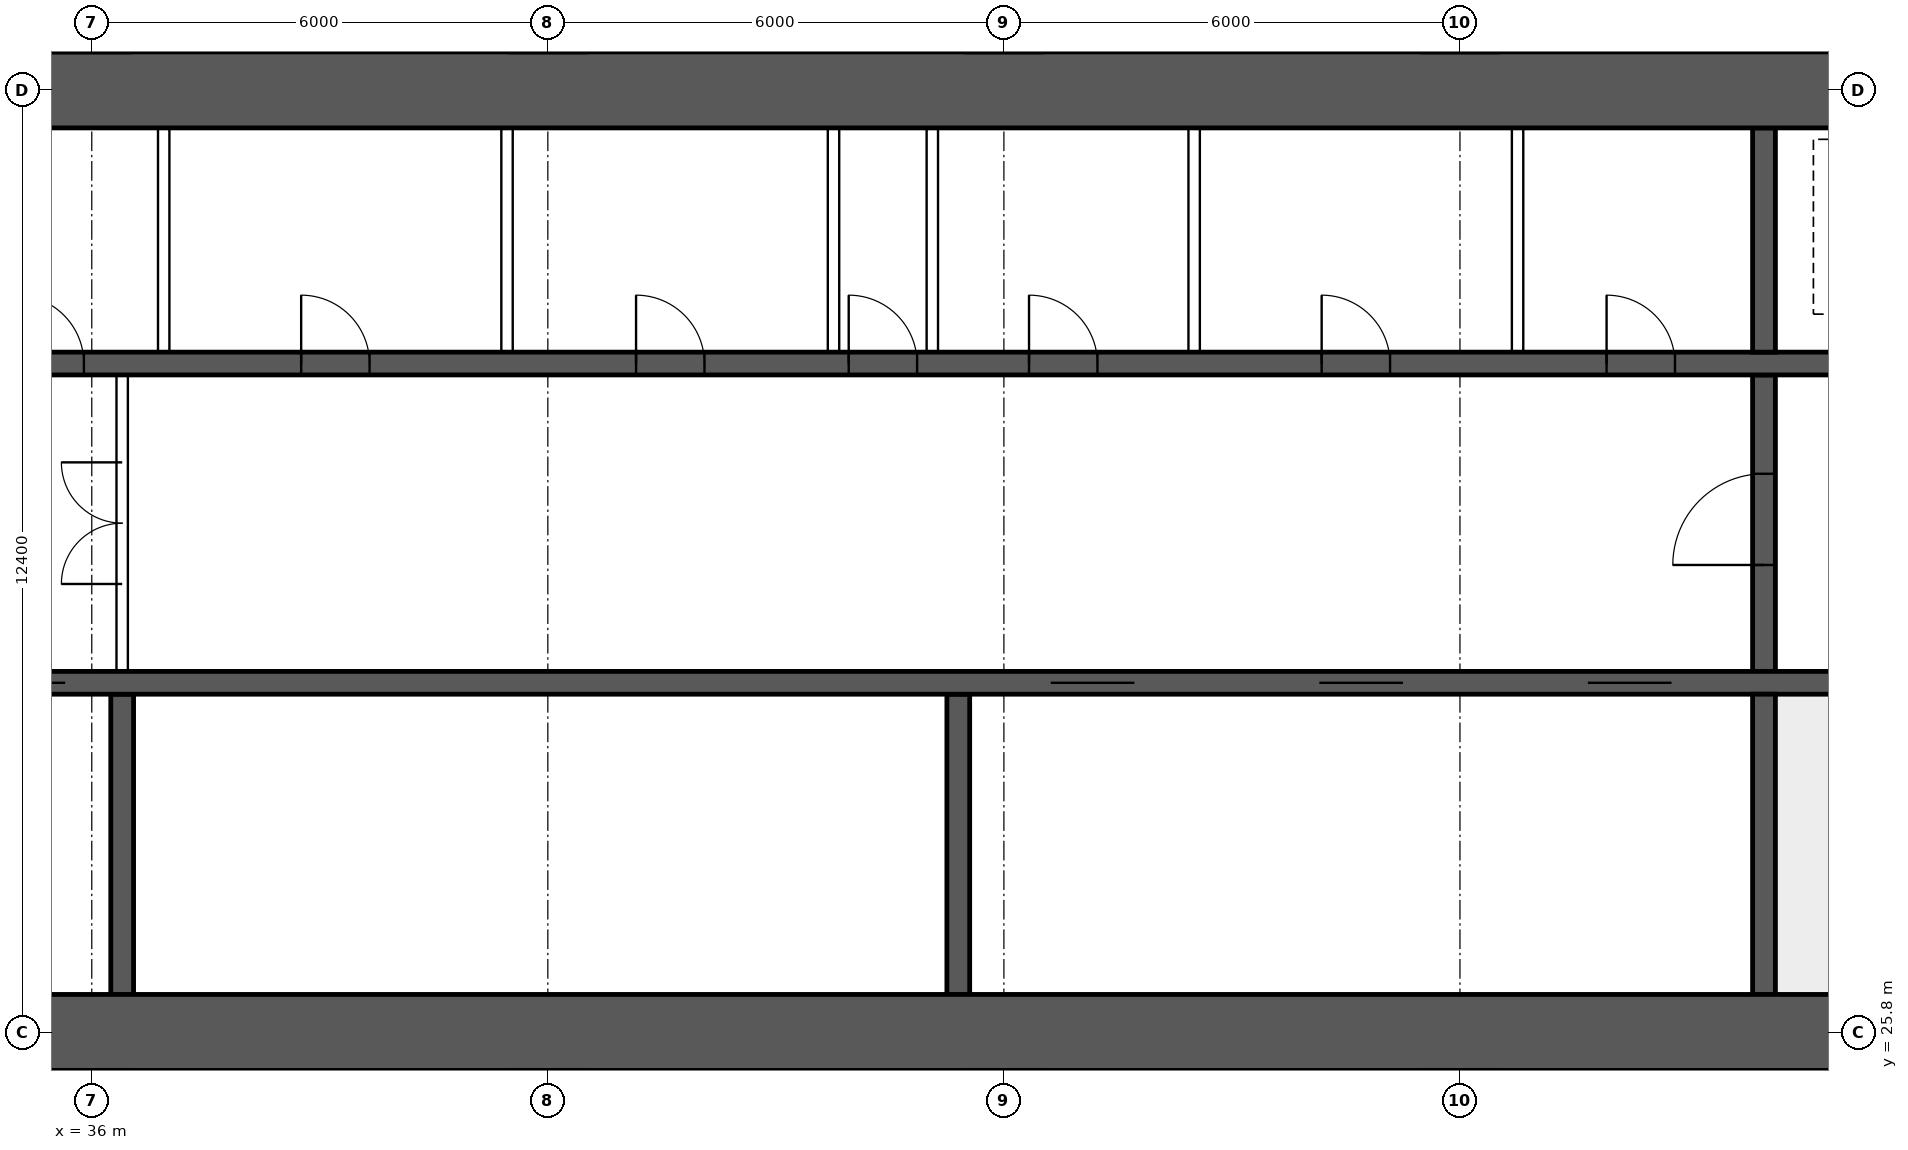
"""IFC4 building model, lengths in metres.
Left out: names, types, materials, properties, quantities, classifications, styles, units other than length and angle.
Written with IfcOpenShell. Run it as: python <this file> out.ifc"""

import sys

from ifc_helpers import new_model, si_unit, direction, frame, frame_2d, origin, place, context, subcontext, project, spatial, rectangle, extrude, element, fill, save


model = new_model("IFC4")
c1 = context("Model", 3, precision=1e-05, world=origin(), true_north=direction((0.0, 1.0)))
c2 = subcontext(c1, "Body", "Model", "MODEL_VIEW")
j1 = project(units=[si_unit("LENGTHUNIT", "METRE"), si_unit("PLANEANGLEUNIT", "RADIAN")], contexts=[c1])
p1 = place(None, origin())
s1 = spatial("IfcSite", under=j1, at=p1, CompositionType="ELEMENT")
p2 = place(p1, origin())
s2 = spatial("IfcBuilding", under=s1, at=p2, CompositionType="ELEMENT")
p3 = place(p2, frame((0.0, 0.0, 20.2)))
s3 = spatial("IfcBuildingStorey", under=s2, at=p3, CompositionType="ELEMENT", Elevation=20.2)
for number, where, z_axis, x_axis in (
    (1, (18.0, 25.8, 0.0), (0.0, 0.0, 1.0), (1.0, 0.0, 0.0)),
    (2, (18.0, 38.2, 0.0), (0.0, 0.0, 1.0), (1.0, 0.0, 0.0)),
):
    element("IfcWall", number, at=place(p3, frame(where, z_axis=z_axis, x_axis=x_axis)), inside=s3, PredefinedType="SHEAR", context=c2, shape_type="SweptSolid", body=[
        extrude(rectangle(XDim=48.0, YDim=1.0, at=frame_2d((24.0, 0.0))), origin(), (0.0, 0.0, 1.0), 3.75),
    ])
p4 = place(p3, frame((18.5, 30.4, 0.0), z_axis=(0.0, 0.0, 1.0), x_axis=(1.0, 0.0, 0.0)))
e3 = element("IfcWall", 3, at=p4, inside=s3, PredefinedType="SHEAR", context=c2, shape_type="SweptSolid", body=[
    extrude(rectangle(XDim=47.0, YDim=0.3, at=frame_2d((23.5, 0.0))), origin(), (0.0, 0.0, 1.0), 3.75),
])
p5 = place(p4, frame((0.4, 0.0, 0.0)))
e4 = element("IfcOpeningElement", 4, at=p5, cuts=e3, PredefinedType="OPENING", context=c2, shape_type="SweptSolid", body=[
    extrude(rectangle(XDim=1.0, YDim=2.1, at=frame_2d((0.5, 1.05))), frame((0.0, 0.16, 0.0), z_axis=(0.0, -1.0, 0.0), x_axis=(1.0, 0.0, 0.0)), (0.0, 0.0, 1.0), 0.32),
])
p6 = place(p4, frame((45.6, 0.0, 0.0)))
e5 = element("IfcOpeningElement", 5, at=p6, cuts=e3, PredefinedType="OPENING", context=c2, shape_type="SweptSolid", body=[
    extrude(rectangle(XDim=1.0, YDim=2.1, at=frame_2d((0.5, 1.05))), frame((0.0, 0.16, 0.0), z_axis=(0.0, -1.0, 0.0), x_axis=(1.0, 0.0, 0.0)), (0.0, 0.0, 1.0), 0.32),
])
p7 = place(p4, frame((8.25, 0.0, 0.0)))
e6 = element("IfcOpeningElement", 6, at=p7, cuts=e3, PredefinedType="OPENING", context=c2, shape_type="SweptSolid", body=[
    extrude(rectangle(XDim=1.1, YDim=2.1, at=frame_2d((0.55, 1.05))), frame((0.0, 0.16, 0.0), z_axis=(0.0, -1.0, 0.0), x_axis=(1.0, 0.0, 0.0)), (0.0, 0.0, 1.0), 0.32),
])
p8 = place(p4, frame((10.85, 0.0, 0.0)))
e7 = element("IfcOpeningElement", 7, at=p8, cuts=e3, PredefinedType="OPENING", context=c2, shape_type="SweptSolid", body=[
    extrude(rectangle(XDim=1.1, YDim=2.1, at=frame_2d((0.55, 1.05))), frame((0.0, 0.16, 0.0), z_axis=(0.0, -1.0, 0.0), x_axis=(1.0, 0.0, 0.0)), (0.0, 0.0, 1.0), 0.32),
])
p9 = place(p4, frame((13.45, 0.0, 0.0)))
e8 = element("IfcOpeningElement", 8, at=p9, cuts=e3, PredefinedType="OPENING", context=c2, shape_type="SweptSolid", body=[
    extrude(rectangle(XDim=1.1, YDim=2.1, at=frame_2d((0.55, 1.05))), frame((0.0, 0.16, 0.0), z_axis=(0.0, -1.0, 0.0), x_axis=(1.0, 0.0, 0.0)), (0.0, 0.0, 1.0), 0.32),
])
p10 = place(p4, frame((16.05, 0.0, 0.0)))
e9 = element("IfcOpeningElement", 9, at=p10, cuts=e3, PredefinedType="OPENING", context=c2, shape_type="SweptSolid", body=[
    extrude(rectangle(XDim=1.1, YDim=2.1, at=frame_2d((0.55, 1.05))), frame((0.0, 0.16, 0.0), z_axis=(0.0, -1.0, 0.0), x_axis=(1.0, 0.0, 0.0)), (0.0, 0.0, 1.0), 0.32),
])
p11 = place(p4, frame((30.117, 0.0, 0.0)))
e10 = element("IfcOpeningElement", 10, at=p11, cuts=e3, PredefinedType="OPENING", context=c2, shape_type="SweptSolid", body=[
    extrude(rectangle(XDim=1.1, YDim=2.1, at=frame_2d((0.55, 1.05))), frame((0.0, 0.16, 0.0), z_axis=(0.0, -1.0, 0.0), x_axis=(1.0, 0.0, 0.0)), (0.0, 0.0, 1.0), 0.32),
])
p12 = place(p4, frame((33.65, 0.0, 0.0)))
e11 = element("IfcOpeningElement", 11, at=p12, cuts=e3, PredefinedType="OPENING", context=c2, shape_type="SweptSolid", body=[
    extrude(rectangle(XDim=1.1, YDim=2.1, at=frame_2d((0.55, 1.05))), frame((0.0, 0.16, 0.0), z_axis=(0.0, -1.0, 0.0), x_axis=(1.0, 0.0, 0.0)), (0.0, 0.0, 1.0), 0.32),
])
p13 = place(p4, frame((37.183, 0.0, 0.0)))
e12 = element("IfcOpeningElement", 12, at=p13, cuts=e3, PredefinedType="OPENING", context=c2, shape_type="SweptSolid", body=[
    extrude(rectangle(XDim=1.1, YDim=2.1, at=frame_2d((0.55, 1.05))), frame((0.0, 0.16, 0.0), z_axis=(0.0, -1.0, 0.0), x_axis=(1.0, 0.0, 0.0)), (0.0, 0.0, 1.0), 0.32),
])
p14 = place(p3, frame((18.5, 34.6, 0.0), z_axis=(0.0, 0.0, 1.0), x_axis=(1.0, 0.0, 0.0)))
e13 = element("IfcWall", 13, at=p14, inside=s3, PredefinedType="SHEAR", context=c2, shape_type="SweptSolid", body=[
    extrude(rectangle(XDim=47.0, YDim=0.3, at=frame_2d((23.5, 0.0))), origin(), (0.0, 0.0, 1.0), 3.75),
])
p15 = place(p14, frame((0.9, 0.0, 0.0)))
e14 = element("IfcOpeningElement", 14, at=p15, cuts=e13, PredefinedType="OPENING", context=c2, shape_type="SweptSolid", body=[
    extrude(rectangle(XDim=1.1, YDim=2.1, at=frame_2d((0.55, 1.05))), frame((0.0, 0.16, 0.0), z_axis=(0.0, -1.0, 0.0), x_axis=(1.0, 0.0, 0.0)), (0.0, 0.0, 1.0), 0.32),
])
p16 = place(p14, frame((45.0, 0.0, 0.0)))
e15 = element("IfcOpeningElement", 15, at=p16, cuts=e13, PredefinedType="OPENING", context=c2, shape_type="SweptSolid", body=[
    extrude(rectangle(XDim=1.1, YDim=2.1, at=frame_2d((0.55, 1.05))), frame((0.0, 0.16, 0.0), z_axis=(0.0, -1.0, 0.0), x_axis=(1.0, 0.0, 0.0)), (0.0, 0.0, 1.0), 0.32),
])
p17 = place(p14, frame((4.1, 0.0, 0.0)))
e16 = element("IfcOpeningElement", 16, at=p17, cuts=e13, PredefinedType="OPENING", context=c2, shape_type="SweptSolid", body=[
    extrude(rectangle(XDim=0.9, YDim=2.1, at=frame_2d((0.45, 1.05))), frame((0.0, 0.16, 0.0), z_axis=(0.0, -1.0, 0.0), x_axis=(1.0, 0.0, 0.0)), (0.0, 0.0, 1.0), 0.32),
])
p18 = place(p14, frame((42.0, 0.0, 0.0)))
e17 = element("IfcOpeningElement", 17, at=p18, cuts=e13, PredefinedType="OPENING", context=c2, shape_type="SweptSolid", body=[
    extrude(rectangle(XDim=0.9, YDim=2.1, at=frame_2d((0.45, 1.05))), frame((0.0, 0.16, 0.0), z_axis=(0.0, -1.0, 0.0), x_axis=(1.0, 0.0, 0.0)), (0.0, 0.0, 1.0), 0.32),
])
p19 = place(p14, frame((8.875, 0.0, 0.0)))
e18 = element("IfcOpeningElement", 18, at=p19, cuts=e13, PredefinedType="OPENING", context=c2, shape_type="SweptSolid", body=[
    extrude(rectangle(XDim=0.9, YDim=2.1, at=frame_2d((0.45, 1.05))), frame((0.0, 0.16, 0.0), z_axis=(0.0, -1.0, 0.0), x_axis=(1.0, 0.0, 0.0)), (0.0, 0.0, 1.0), 0.32),
])
p20 = place(p14, frame((12.849, 0.0, 0.0)))
e19 = element("IfcOpeningElement", 19, at=p20, cuts=e13, PredefinedType="OPENING", context=c2, shape_type="SweptSolid", body=[
    extrude(rectangle(XDim=0.9, YDim=2.1, at=frame_2d((0.45, 1.05))), frame((0.0, 0.16, 0.0), z_axis=(0.0, -1.0, 0.0), x_axis=(1.0, 0.0, 0.0)), (0.0, 0.0, 1.0), 0.32),
])
p21 = place(p14, frame((16.496, 0.0, 0.0)))
e20 = element("IfcOpeningElement", 20, at=p21, cuts=e13, PredefinedType="OPENING", context=c2, shape_type="SweptSolid", body=[
    extrude(rectangle(XDim=0.9, YDim=2.1, at=frame_2d((0.45, 1.05))), frame((0.0, 0.16, 0.0), z_axis=(0.0, -1.0, 0.0), x_axis=(1.0, 0.0, 0.0)), (0.0, 0.0, 1.0), 0.32),
])
p22 = place(p14, frame((20.255, 0.0, 0.0)))
e21 = element("IfcOpeningElement", 21, at=p22, cuts=e13, PredefinedType="OPENING", context=c2, shape_type="SweptSolid", body=[
    extrude(rectangle(XDim=0.9, YDim=2.1, at=frame_2d((0.45, 1.05))), frame((0.0, 0.16, 0.0), z_axis=(0.0, -1.0, 0.0), x_axis=(1.0, 0.0, 0.0)), (0.0, 0.0, 1.0), 0.32),
])
p23 = place(p14, frame((24.661, 0.0, 0.0)))
e22 = element("IfcOpeningElement", 22, at=p23, cuts=e13, PredefinedType="OPENING", context=c2, shape_type="SweptSolid", body=[
    extrude(rectangle(XDim=0.9, YDim=2.1, at=frame_2d((0.45, 1.05))), frame((0.0, 0.16, 0.0), z_axis=(0.0, -1.0, 0.0), x_axis=(1.0, 0.0, 0.0)), (0.0, 0.0, 1.0), 0.32),
])
p24 = place(p14, frame((27.458, 0.0, 0.0)))
e23 = element("IfcOpeningElement", 23, at=p24, cuts=e13, PredefinedType="OPENING", context=c2, shape_type="SweptSolid", body=[
    extrude(rectangle(XDim=0.9, YDim=2.1, at=frame_2d((0.45, 1.05))), frame((0.0, 0.16, 0.0), z_axis=(0.0, -1.0, 0.0), x_axis=(1.0, 0.0, 0.0)), (0.0, 0.0, 1.0), 0.32),
])
p25 = place(p14, frame((29.831, 0.0, 0.0)))
e24 = element("IfcOpeningElement", 24, at=p25, cuts=e13, PredefinedType="OPENING", context=c2, shape_type="SweptSolid", body=[
    extrude(rectangle(XDim=0.9, YDim=2.1, at=frame_2d((0.45, 1.05))), frame((0.0, 0.16, 0.0), z_axis=(0.0, -1.0, 0.0), x_axis=(1.0, 0.0, 0.0)), (0.0, 0.0, 1.0), 0.32),
])
p26 = place(p14, frame((33.68, 0.0, 0.0)))
e25 = element("IfcOpeningElement", 25, at=p26, cuts=e13, PredefinedType="OPENING", context=c2, shape_type="SweptSolid", body=[
    extrude(rectangle(XDim=0.9, YDim=2.1, at=frame_2d((0.45, 1.05))), frame((0.0, 0.16, 0.0), z_axis=(0.0, -1.0, 0.0), x_axis=(1.0, 0.0, 0.0)), (0.0, 0.0, 1.0), 0.32),
])
p27 = place(p14, frame((37.429, 0.0, 0.0)))
e26 = element("IfcOpeningElement", 26, at=p27, cuts=e13, PredefinedType="OPENING", context=c2, shape_type="SweptSolid", body=[
    extrude(rectangle(XDim=0.9, YDim=2.1, at=frame_2d((0.45, 1.05))), frame((0.0, 0.16, 0.0), z_axis=(0.0, -1.0, 0.0), x_axis=(1.0, 0.0, 0.0)), (0.0, 0.0, 1.0), 0.32),
])
p28 = place(p3, frame((58.0, 26.3, 0.0), z_axis=(0.0, 0.0, 1.0), x_axis=(0.0, 1.0, 0.0)))
e27 = element("IfcWall", 27, at=p28, inside=s3, PredefinedType="SHEAR", context=c2, shape_type="SweptSolid", body=[
    extrude(rectangle(XDim=3.95, YDim=0.3, at=frame_2d((1.975, 0.0))), origin(), (0.0, 0.0, 1.0), 3.75),
])
p29 = place(p3, frame((58.0, 30.55, 0.0), z_axis=(0.0, 0.0, 1.0), x_axis=(0.0, 1.0, 0.0)))
e28 = element("IfcWall", 28, at=p29, inside=s3, PredefinedType="SHEAR", context=c2, shape_type="SweptSolid", body=[
    extrude(rectangle(XDim=3.9, YDim=0.3, at=frame_2d((1.95, 0.0))), origin(), (0.0, 0.0, 1.0), 3.75),
])
p30 = place(p29, frame((1.4, 0.0, 0.0)))
e29 = element("IfcOpeningElement", 29, at=p30, cuts=e28, PredefinedType="OPENING", context=c2, shape_type="SweptSolid", body=[
    extrude(rectangle(XDim=1.2, YDim=2.1, at=frame_2d((0.6, 1.05))), frame((0.0, 0.16, 0.0), z_axis=(0.0, -1.0, 0.0), x_axis=(1.0, 0.0, 0.0)), (0.0, 0.0, 1.0), 0.32),
])
p31 = place(p3, frame((58.0, 34.75, 0.0), z_axis=(0.0, 0.0, 1.0), x_axis=(0.0, 1.0, 0.0)))
e30 = element("IfcWall", 30, at=p31, inside=s3, PredefinedType="SHEAR", context=c2, shape_type="SweptSolid", body=[
    extrude(rectangle(XDim=2.95, YDim=0.3, at=frame_2d((1.475, 0.0))), origin(), (0.0, 0.0, 1.0), 3.75),
])
for number, where, z_axis, x_axis in (
    (31, (36.4, 26.3, 0.0), (0.0, 0.0, 1.0), (0.0, 1.0, 0.0)),
    (32, (47.4, 26.3, 0.0), (0.0, 0.0, 1.0), (0.0, 1.0, 0.0)),
):
    element("IfcWall", number, at=place(p3, frame(where, z_axis=z_axis, x_axis=x_axis)), inside=s3, PredefinedType="SHEAR", context=c2, shape_type="SweptSolid", body=[
        extrude(rectangle(XDim=3.95, YDim=0.3, at=frame_2d((1.975, 0.0))), origin(), (0.0, 0.0, 1.0), 3.75),
    ])
p32 = place(p3, frame((36.4, 30.55, 0.0), z_axis=(0.0, 0.0, 1.0), x_axis=(0.0, 1.0, 0.0)))
e33 = element("IfcWall", 33, at=p32, inside=s3, PredefinedType="SOLIDWALL", context=c2, shape_type="SweptSolid", body=[
    extrude(rectangle(XDim=3.9, YDim=0.15, at=frame_2d((1.95, 0.0))), origin(), (0.0, 0.0, 1.0), 3.3),
])
p33 = place(p32, frame((1.15, 0.0, 0.0)))
e34 = element("IfcOpeningElement", 34, at=p33, cuts=e33, PredefinedType="OPENING", context=c2, shape_type="SweptSolid", body=[
    extrude(rectangle(XDim=1.6, YDim=2.1, at=frame_2d((0.8, 1.05))), frame((0.0, 0.085, 0.0), z_axis=(0.0, -1.0, 0.0), x_axis=(1.0, 0.0, 0.0)), (0.0, 0.0, 1.0), 0.17),
])
for number, where, z_axis, x_axis in (
    (35, (36.946, 34.75, 0.0), (0.0, 0.0, 1.0), (0.0, 1.0, 0.0)),
    (36, (41.463, 34.75, 0.0), (0.0, 0.0, 1.0), (0.0, 1.0, 0.0)),
    (37, (45.758, 34.75, 0.0), (0.0, 0.0, 1.0), (0.0, 1.0, 0.0)),
    (38, (47.058, 34.75, 0.0), (0.0, 0.0, 1.0), (0.0, 1.0, 0.0)),
    (39, (50.503, 34.75, 0.0), (0.0, 0.0, 1.0), (0.0, 1.0, 0.0)),
    (40, (54.758, 34.75, 0.0), (0.0, 0.0, 1.0), (0.0, 1.0, 0.0)),
):
    element("IfcWall", number, at=place(p3, frame(where, z_axis=z_axis, x_axis=x_axis)), inside=s3, PredefinedType="SOLIDWALL", context=c2, shape_type="SweptSolid", body=[
        extrude(rectangle(XDim=2.95, YDim=0.15, at=frame_2d((1.475, 0.0))), origin(), (0.0, 0.0, 1.0), 3.3),
    ])
for number, where, z_axis, x_axis in (
    (41, (38.79, 14.9, 0.0), (0.0, 0.0, 1.0), (0.0, 1.0, 0.0)),
    (42, (44.6, 14.9, 0.0), (0.0, 0.0, 1.0), (0.0, 1.0, 0.0)),
    (43, (57.6, 14.9, 0.0), (0.0, 0.0, 1.0), (0.0, 1.0, 0.0)),
):
    element("IfcWall", number, at=place(p3, frame(where, z_axis=z_axis, x_axis=x_axis)), inside=s3, PredefinedType="PARTITIONING", context=c2, shape_type="SweptSolid", body=[
        extrude(rectangle(XDim=10.4, YDim=0.15, at=frame_2d((5.2, 0.0))), origin(), (0.0, 0.0, 1.0), 3.3),
    ])
p34 = place(p33, origin())
e44 = element("IfcDoor", 44, at=p34, inside=s3, OperationType="DOUBLE_DOOR_SINGLE_SWING", PredefinedType="DOOR", context=c2, shape_type="SweptSolid", body=[
    extrude(rectangle(XDim=1.6, YDim=2.1, at=frame_2d((0.8, 1.05))), frame((0.0, 0.025, 0.0), z_axis=(0.0, -1.0, 0.0), x_axis=(1.0, 0.0, 0.0)), (0.0, 0.0, 1.0), 0.05),
])
fill(e34, e44)
p35 = place(p30, origin())
e45 = element("IfcDoor", 45, at=p35, inside=s3, OperationType="SINGLE_SWING_LEFT", PredefinedType="DOOR", context=c2, shape_type="SweptSolid", body=[
    extrude(rectangle(XDim=1.2, YDim=2.1, at=frame_2d((0.6, 1.05))), frame((0.0, 0.025, 0.0), z_axis=(0.0, -1.0, 0.0), x_axis=(1.0, 0.0, 0.0)), (0.0, 0.0, 1.0), 0.05),
])
fill(e29, e45)
p36 = place(p21, origin())
e46 = element("IfcDoor", 46, at=p36, inside=s3, OperationType="SINGLE_SWING_LEFT", PredefinedType="DOOR", context=c2, shape_type="SweptSolid", body=[
    extrude(rectangle(XDim=0.9, YDim=2.1, at=frame_2d((0.45, 1.05))), frame((0.0, 0.025, 0.0), z_axis=(0.0, -1.0, 0.0), x_axis=(1.0, 0.0, 0.0)), (0.0, 0.0, 1.0), 0.05),
])
fill(e20, e46)
p37 = place(p22, origin())
e47 = element("IfcDoor", 47, at=p37, inside=s3, OperationType="SINGLE_SWING_LEFT", PredefinedType="DOOR", context=c2, shape_type="SweptSolid", body=[
    extrude(rectangle(XDim=0.9, YDim=2.1, at=frame_2d((0.45, 1.05))), frame((0.0, 0.025, 0.0), z_axis=(0.0, -1.0, 0.0), x_axis=(1.0, 0.0, 0.0)), (0.0, 0.0, 1.0), 0.05),
])
fill(e21, e47)
p38 = place(p23, origin())
e48 = element("IfcDoor", 48, at=p38, inside=s3, OperationType="SINGLE_SWING_LEFT", PredefinedType="DOOR", context=c2, shape_type="SweptSolid", body=[
    extrude(rectangle(XDim=0.9, YDim=2.1, at=frame_2d((0.45, 1.05))), frame((0.0, 0.025, 0.0), z_axis=(0.0, -1.0, 0.0), x_axis=(1.0, 0.0, 0.0)), (0.0, 0.0, 1.0), 0.05),
])
fill(e22, e48)
p39 = place(p24, origin())
e49 = element("IfcDoor", 49, at=p39, inside=s3, OperationType="SINGLE_SWING_LEFT", PredefinedType="DOOR", context=c2, shape_type="SweptSolid", body=[
    extrude(rectangle(XDim=0.9, YDim=2.1, at=frame_2d((0.45, 1.05))), frame((0.0, 0.025, 0.0), z_axis=(0.0, -1.0, 0.0), x_axis=(1.0, 0.0, 0.0)), (0.0, 0.0, 1.0), 0.05),
])
fill(e23, e49)
p40 = place(p25, origin())
e50 = element("IfcDoor", 50, at=p40, inside=s3, OperationType="SINGLE_SWING_LEFT", PredefinedType="DOOR", context=c2, shape_type="SweptSolid", body=[
    extrude(rectangle(XDim=0.9, YDim=2.1, at=frame_2d((0.45, 1.05))), frame((0.0, 0.025, 0.0), z_axis=(0.0, -1.0, 0.0), x_axis=(1.0, 0.0, 0.0)), (0.0, 0.0, 1.0), 0.05),
])
fill(e24, e50)
p41 = place(p26, origin())
e51 = element("IfcDoor", 51, at=p41, inside=s3, OperationType="SINGLE_SWING_LEFT", PredefinedType="DOOR", context=c2, shape_type="SweptSolid", body=[
    extrude(rectangle(XDim=0.9, YDim=2.1, at=frame_2d((0.45, 1.05))), frame((0.0, 0.025, 0.0), z_axis=(0.0, -1.0, 0.0), x_axis=(1.0, 0.0, 0.0)), (0.0, 0.0, 1.0), 0.05),
])
fill(e25, e51)
p42 = place(p27, origin())
e52 = element("IfcDoor", 52, at=p42, inside=s3, OperationType="SINGLE_SWING_LEFT", PredefinedType="DOOR", context=c2, shape_type="SweptSolid", body=[
    extrude(rectangle(XDim=0.9, YDim=2.1, at=frame_2d((0.45, 1.05))), frame((0.0, 0.025, 0.0), z_axis=(0.0, -1.0, 0.0), x_axis=(1.0, 0.0, 0.0)), (0.0, 0.0, 1.0), 0.05),
])
fill(e26, e52)
p43 = place(p10, origin())
e53 = element("IfcDoor", 53, at=p43, inside=s3, OperationType="DOUBLE_DOOR_SLIDING", PredefinedType="DOOR", context=c2, shape_type="SweptSolid", body=[
    extrude(rectangle(XDim=1.1, YDim=2.1, at=frame_2d((0.55, 1.05))), frame((0.0, 0.025, 0.0), z_axis=(0.0, -1.0, 0.0), x_axis=(1.0, 0.0, 0.0)), (0.0, 0.0, 1.0), 0.05),
])
fill(e9, e53)
p44 = place(p11, origin())
e54 = element("IfcDoor", 54, at=p44, inside=s3, OperationType="DOUBLE_DOOR_SLIDING", PredefinedType="DOOR", context=c2, shape_type="SweptSolid", body=[
    extrude(rectangle(XDim=1.1, YDim=2.1, at=frame_2d((0.55, 1.05))), frame((0.0, 0.025, 0.0), z_axis=(0.0, -1.0, 0.0), x_axis=(1.0, 0.0, 0.0)), (0.0, 0.0, 1.0), 0.05),
])
fill(e10, e54)
p45 = place(p12, origin())
e55 = element("IfcDoor", 55, at=p45, inside=s3, OperationType="DOUBLE_DOOR_SLIDING", PredefinedType="DOOR", context=c2, shape_type="SweptSolid", body=[
    extrude(rectangle(XDim=1.1, YDim=2.1, at=frame_2d((0.55, 1.05))), frame((0.0, 0.025, 0.0), z_axis=(0.0, -1.0, 0.0), x_axis=(1.0, 0.0, 0.0)), (0.0, 0.0, 1.0), 0.05),
])
fill(e11, e55)
p46 = place(p13, origin())
e56 = element("IfcDoor", 56, at=p46, inside=s3, OperationType="DOUBLE_DOOR_SLIDING", PredefinedType="DOOR", context=c2, shape_type="SweptSolid", body=[
    extrude(rectangle(XDim=1.1, YDim=2.1, at=frame_2d((0.55, 1.05))), frame((0.0, 0.025, 0.0), z_axis=(0.0, -1.0, 0.0), x_axis=(1.0, 0.0, 0.0)), (0.0, 0.0, 1.0), 0.05),
])
fill(e12, e56)
save(model, sys.argv[1])
